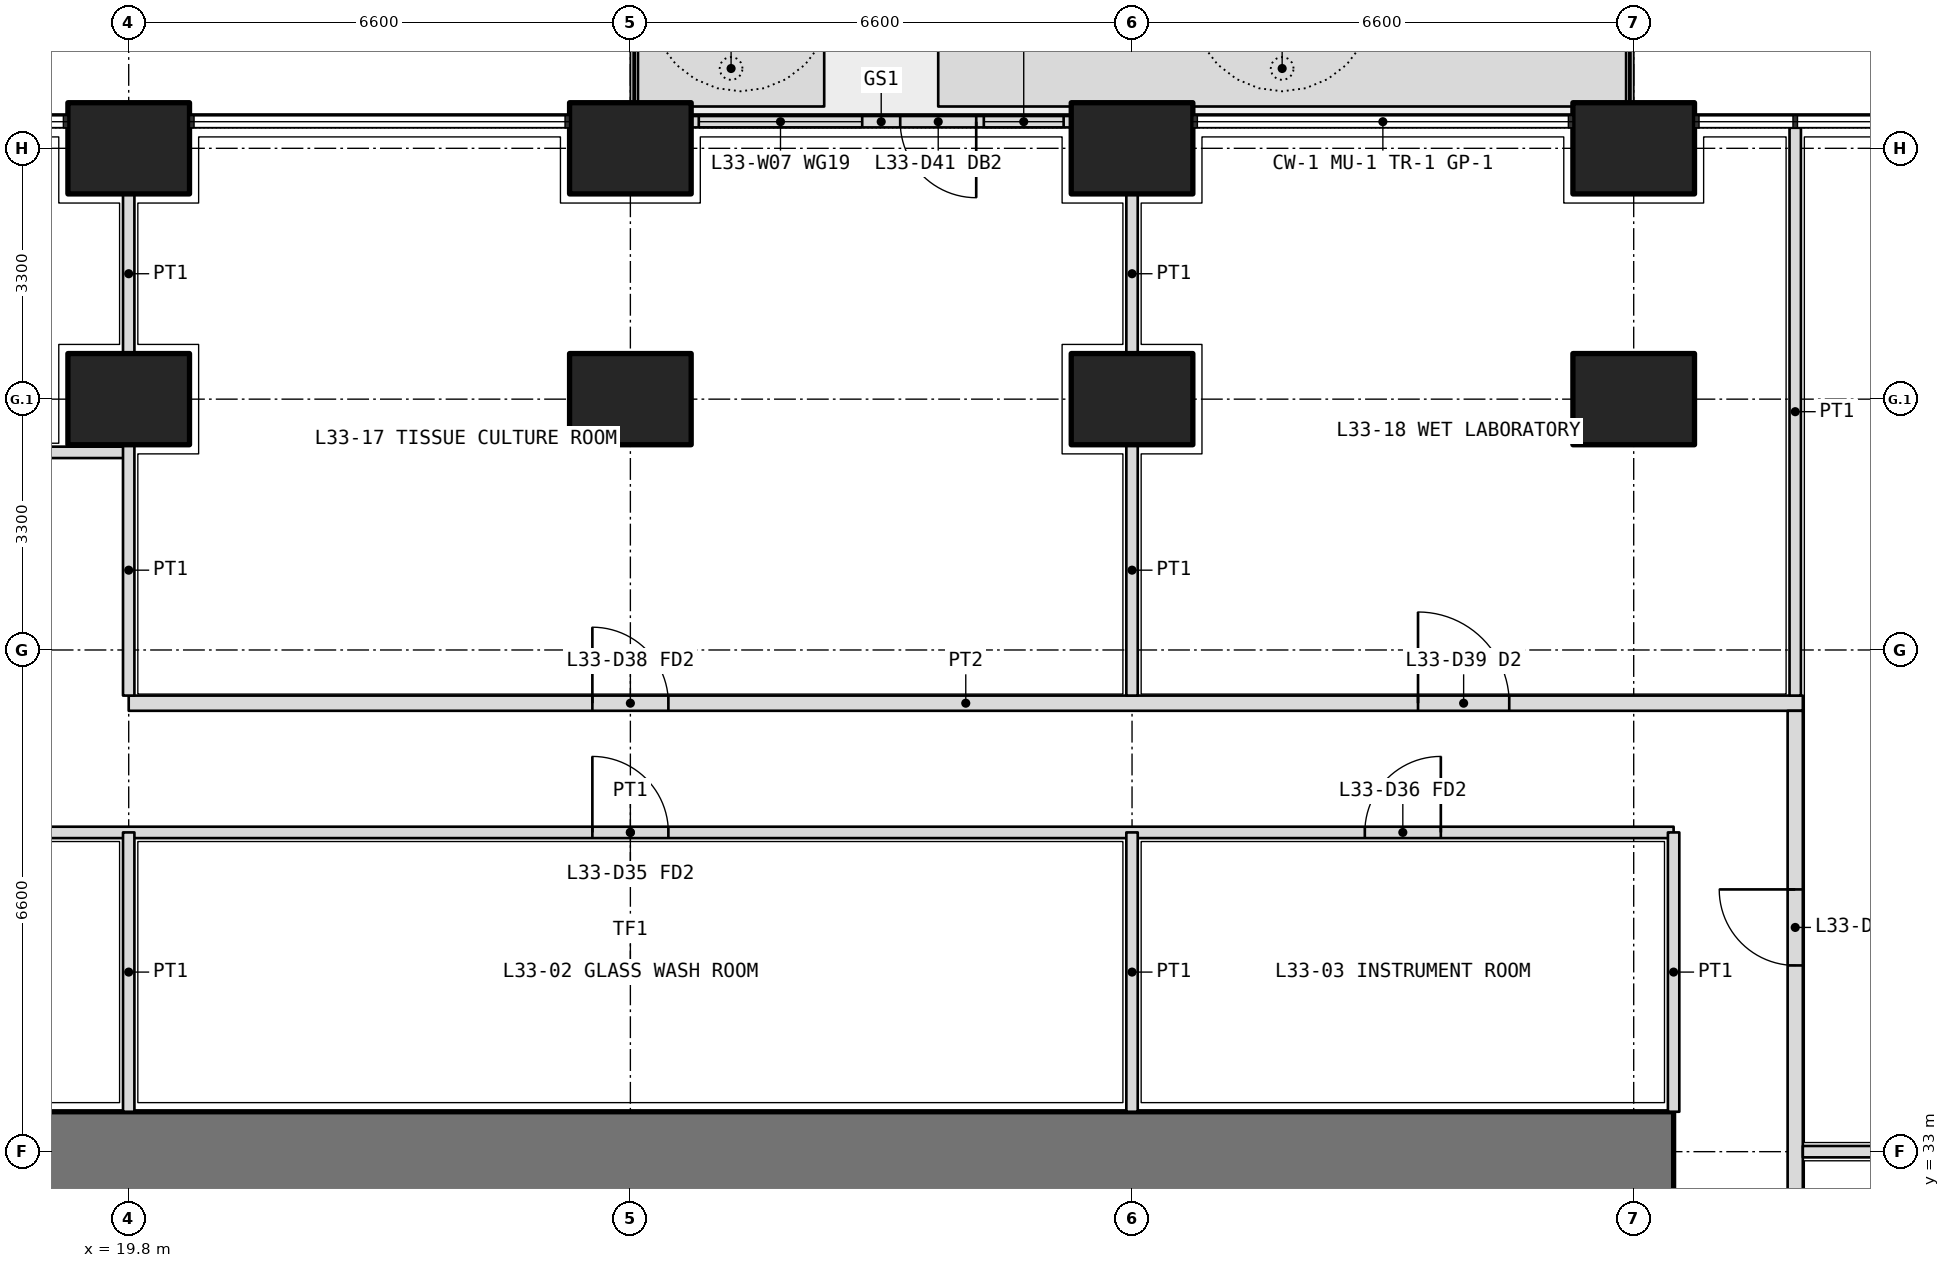
"""IFC4 building model, lengths in metres.
Left out: names, types, materials, properties, quantities, classifications, styles, units other than length and angle.
Written with IfcOpenShell. Run it as: python <this file> out.ifc"""

import sys

from ifc_helpers import new_model, si_unit, direction, frame, frame_2d, origin, origin_2d, place, context, subcontext, project, spatial, polyline, rectangle, outline, extrude, element, fill, save


model = new_model("IFC4")
c1 = context("Model", 3, precision=1e-05, world=origin(), true_north=direction((0.0, 1.0)))
c2 = subcontext(c1, "Body", "Model", "MODEL_VIEW")
j1 = project(units=[si_unit("LENGTHUNIT", "METRE"), si_unit("PLANEANGLEUNIT", "RADIAN")], contexts=[c1])
p1 = place(None, origin())
s1 = spatial("IfcSite", under=j1, at=p1, CompositionType="ELEMENT")
p2 = place(p1, origin())
s2 = spatial("IfcBuilding", under=s1, at=p2, CompositionType="ELEMENT")
p3 = place(p2, frame((0.0, 0.0, 145.2)))
s3 = spatial("IfcBuildingStorey", under=s2, at=p3, CompositionType="ELEMENT", Elevation=145.2)
for number, where, z_axis, x_axis in (
    (1, (19.8, 46.2, 0.0), (0.0, 0.0, 1.0), (1.0, 0.0, 0.0)),
    (2, (26.4, 46.2, 0.0), (0.0, 0.0, 1.0), (1.0, 0.0, 0.0)),
    (3, (33.0, 46.2, 0.0), (0.0, 0.0, 1.0), (1.0, 0.0, 0.0)),
    (4, (39.6, 46.2, 0.0), (0.0, 0.0, 1.0), (1.0, 0.0, 0.0)),
    (5, (19.8, 42.9, 0.0), (0.0, 0.0, 1.0), (1.0, 0.0, 0.0)),
    (6, (26.4, 42.9, 0.0), (0.0, 0.0, 1.0), (1.0, 0.0, 0.0)),
    (7, (33.0, 42.9, 0.0), (0.0, 0.0, 1.0), (1.0, 0.0, 0.0)),
    (8, (39.6, 42.9, 0.0), (0.0, 0.0, 1.0), (1.0, 0.0, 0.0)),
):
    element("IfcColumn", number, at=place(p3, frame(where, z_axis=z_axis, x_axis=x_axis)), inside=s3, PredefinedType="COLUMN", context=c2, shape_type="SweptSolid", body=[
        extrude(rectangle(XDim=1.6, YDim=1.2, at=origin_2d()), origin(), (0.0, 0.0, 1.0), 4.2),
    ])
p4 = place(p3, origin())
e9 = element("IfcWall", 9, at=p4, inside=s3, PredefinedType="USERDEFINED", context=c2, shape_type="SweptSolid", body=[
    extrude(outline(polyline([(26.5, 46.75), (28.95, 46.75), (28.95, 47.75), (26.5, 47.75), (26.5, 46.75)]), holes=[polyline([(26.65, 46.9), (28.8, 46.9), (28.8, 47.6), (26.65, 47.6), (26.65, 46.9)])]), origin(), (0.0, 0.0, 1.0), 1.05),
])
p5 = place(p3, origin())
e10 = element("IfcWall", 10, at=p5, inside=s3, PredefinedType="USERDEFINED", context=c2, shape_type="SweptSolid", body=[
    extrude(outline(polyline([(30.45, 46.75), (39.5, 46.75), (39.5, 47.75), (30.45, 47.75), (30.45, 46.75)]), holes=[polyline([(30.6, 46.9), (39.35, 46.9), (39.35, 47.6), (30.6, 47.6), (30.6, 46.9)])]), origin(), (0.0, 0.0, 1.0), 1.05),
])
p6 = place(p3, frame((32.2, 46.55, 0.0), z_axis=(0.0, 0.0, 1.0), x_axis=(-1.0, 0.0, 0.0)))
e11 = element("IfcWall", 11, at=p6, inside=s3, PredefinedType="SOLIDWALL", context=c2, shape_type="SweptSolid", body=[
    extrude(rectangle(XDim=5.0, YDim=0.15, at=frame_2d((2.5, 0.0))), origin(), (0.0, 0.0, 1.0), 2.05),
])
p7 = place(p6, frame((1.25, 0.0, 0.0)))
e12 = element("IfcOpeningElement", 12, at=p7, cuts=e11, PredefinedType="OPENING", context=c2, shape_type="SweptSolid", body=[
    extrude(rectangle(XDim=1.0, YDim=2.0, at=frame_2d((0.5, 1.0))), frame((0.0, 0.085, 0.0), z_axis=(0.0, -1.0, 0.0), x_axis=(1.0, 0.0, 0.0)), (0.0, 0.0, 1.0), 0.17),
])
p8 = place(p6, frame((0.1, 0.0, 0.1)))
e13 = element("IfcOpeningElement", 13, at=p8, cuts=e11, PredefinedType="OPENING", context=c2, shape_type="SweptSolid", body=[
    extrude(rectangle(XDim=1.05, YDim=1.65, at=frame_2d((0.525, 0.825))), frame((0.0, 0.085, 0.0), z_axis=(0.0, -1.0, 0.0), x_axis=(1.0, 0.0, 0.0)), (0.0, 0.0, 1.0), 0.17),
])
p9 = place(p6, frame((2.75, 0.0, 0.1)))
e14 = element("IfcOpeningElement", 14, at=p9, cuts=e11, PredefinedType="OPENING", context=c2, shape_type="SweptSolid", body=[
    extrude(rectangle(XDim=2.15, YDim=1.65, at=frame_2d((1.075, 0.825))), frame((0.0, 0.085, 0.0), z_axis=(0.0, -1.0, 0.0), x_axis=(1.0, 0.0, 0.0)), (0.0, 0.0, 1.0), 0.17),
])
p10 = place(p3, frame((40.125, 33.0, 0.0), z_axis=(0.0, 0.0, 1.0), x_axis=(-1.0, 0.0, 0.0)))
e15 = element("IfcWall", 15, at=p10, inside=s3, PredefinedType="SHEAR", context=c2, shape_type="SweptSolid", body=[
    extrude(rectangle(XDim=27.45, YDim=1.05, at=frame_2d((13.725, 0.0))), origin(), (0.0, 0.0, 1.0), 4.2),
])
p11 = place(p3, frame((12.675, 37.2, 0.0), z_axis=(0.0, 0.0, 1.0), x_axis=(1.0, 0.0, 0.0)))
e16 = element("IfcWall", 16, at=p11, inside=s3, PredefinedType="PARTITIONING", context=c2, shape_type="SweptSolid", body=[
    extrude(rectangle(XDim=27.45, YDim=0.15, at=frame_2d((13.725, 0.0))), origin(), (0.0, 0.0, 1.0), 2.55),
])
p12 = place(p11, frame((3.062, 0.0, 0.0)))
e17 = element("IfcOpeningElement", 17, at=p12, cuts=e16, PredefinedType="OPENING", context=c2, shape_type="SweptSolid", body=[
    extrude(rectangle(XDim=1.0, YDim=2.1, at=frame_2d((0.5, 1.05))), frame((0.0, 0.085, 0.0), z_axis=(0.0, -1.0, 0.0), x_axis=(1.0, 0.0, 0.0)), (0.0, 0.0, 1.0), 0.17),
])
p13 = place(p11, frame((13.225, 0.0, 0.0)))
e18 = element("IfcOpeningElement", 18, at=p13, cuts=e16, PredefinedType="OPENING", context=c2, shape_type="SweptSolid", body=[
    extrude(rectangle(XDim=1.0, YDim=2.1, at=frame_2d((0.5, 1.05))), frame((0.0, 0.085, 0.0), z_axis=(0.0, -1.0, 0.0), x_axis=(1.0, 0.0, 0.0)), (0.0, 0.0, 1.0), 0.17),
])
p14 = place(p11, frame((23.387, 0.0, 0.0)))
e19 = element("IfcOpeningElement", 19, at=p14, cuts=e16, PredefinedType="OPENING", context=c2, shape_type="SweptSolid", body=[
    extrude(rectangle(XDim=1.0, YDim=2.1, at=frame_2d((0.5, 1.05))), frame((0.0, 0.085, 0.0), z_axis=(0.0, -1.0, 0.0), x_axis=(1.0, 0.0, 0.0)), (0.0, 0.0, 1.0), 0.17),
])
for number, where, z_axis, x_axis in (
    (20, (40.125, 33.525, 0.0), (0.0, 0.0, 1.0), (0.0, 1.0, 0.0)),
    (21, (19.8, 33.525, 0.0), (0.0, 0.0, 1.0), (0.0, 1.0, 0.0)),
    (22, (33.0, 33.525, 0.0), (0.0, 0.0, 1.0), (0.0, 1.0, 0.0)),
):
    element("IfcWall", number, at=place(p3, frame(where, z_axis=z_axis, x_axis=x_axis)), inside=s3, PredefinedType="PARTITIONING", context=c2, shape_type="SweptSolid", body=[
        extrude(rectangle(XDim=3.675, YDim=0.15, at=frame_2d((1.837, 0.0))), origin(), (0.0, 0.0, 1.0), 2.55),
    ])
p15 = place(p3, frame((19.8, 38.9, 0.0), z_axis=(0.0, 0.0, 1.0), x_axis=(1.0, 0.0, 0.0)))
e23 = element("IfcWall", 23, at=p15, inside=s3, PredefinedType="PARTITIONING", context=c2, shape_type="SweptSolid", body=[
    extrude(rectangle(XDim=22.025, YDim=0.2, at=frame_2d((11.012, 0.0))), origin(), (0.0, 0.0, 1.0), 2.55),
])
p16 = place(p15, frame((6.1, 0.0, 0.0)))
e24 = element("IfcOpeningElement", 24, at=p16, cuts=e23, PredefinedType="OPENING", context=c2, shape_type="SweptSolid", body=[
    extrude(rectangle(XDim=1.0, YDim=2.1, at=frame_2d((0.5, 1.05))), frame((0.0, 0.11, 0.0), z_axis=(0.0, -1.0, 0.0), x_axis=(1.0, 0.0, 0.0)), (0.0, 0.0, 1.0), 0.22),
])
p17 = place(p15, frame((16.962, 0.0, 0.0)))
e25 = element("IfcOpeningElement", 25, at=p17, cuts=e23, PredefinedType="OPENING", context=c2, shape_type="SweptSolid", body=[
    extrude(rectangle(XDim=1.2, YDim=2.1, at=frame_2d((0.6, 1.05))), frame((0.0, 0.11, 0.0), z_axis=(0.0, -1.0, 0.0), x_axis=(1.0, 0.0, 0.0)), (0.0, 0.0, 1.0), 0.22),
])
p18 = place(p3, frame((41.725, 11.175, 0.0), z_axis=(0.0, 0.0, 1.0), x_axis=(0.0, 1.0, 0.0)))
e26 = element("IfcWall", 26, at=p18, inside=s3, PredefinedType="PARTITIONING", context=c2, shape_type="SweptSolid", body=[
    extrude(rectangle(XDim=27.625, YDim=0.2, at=frame_2d((13.812, 0.0))), origin(), (0.0, 0.0, 1.0), 2.55),
])
p19 = place(p18, frame((3.762, 0.0, 0.0)))
e27 = element("IfcOpeningElement", 27, at=p19, cuts=e26, PredefinedType="OPENING", context=c2, shape_type="SweptSolid", body=[
    extrude(rectangle(XDim=1.0, YDim=2.1, at=frame_2d((0.5, 1.05))), frame((0.0, 0.11, 0.0), z_axis=(0.0, -1.0, 0.0), x_axis=(1.0, 0.0, 0.0)), (0.0, 0.0, 1.0), 0.22),
])
p20 = place(p18, frame((9.725, 0.0, 0.0)))
e28 = element("IfcOpeningElement", 28, at=p20, cuts=e26, PredefinedType="OPENING", context=c2, shape_type="SweptSolid", body=[
    extrude(rectangle(XDim=1.0, YDim=2.1, at=frame_2d((0.5, 1.05))), frame((0.0, 0.11, 0.0), z_axis=(0.0, -1.0, 0.0), x_axis=(1.0, 0.0, 0.0)), (0.0, 0.0, 1.0), 0.22),
])
p21 = place(p18, frame((13.075, 0.0, 0.0)))
e29 = element("IfcOpeningElement", 29, at=p21, cuts=e26, PredefinedType="OPENING", context=c2, shape_type="SweptSolid", body=[
    extrude(rectangle(XDim=0.9, YDim=2.1, at=frame_2d((0.45, 1.05))), frame((0.0, 0.11, 0.0), z_axis=(0.0, -1.0, 0.0), x_axis=(1.0, 0.0, 0.0)), (0.0, 0.0, 1.0), 0.22),
])
p22 = place(p18, frame((16.375, 0.0, 0.0)))
e30 = element("IfcOpeningElement", 30, at=p22, cuts=e26, PredefinedType="OPENING", context=c2, shape_type="SweptSolid", body=[
    extrude(rectangle(XDim=1.0, YDim=2.1, at=frame_2d((0.5, 1.05))), frame((0.0, 0.11, 0.0), z_axis=(0.0, -1.0, 0.0), x_axis=(1.0, 0.0, 0.0)), (0.0, 0.0, 1.0), 0.22),
])
p23 = place(p18, frame((19.675, 0.0, 0.0)))
e31 = element("IfcOpeningElement", 31, at=p23, cuts=e26, PredefinedType="OPENING", context=c2, shape_type="SweptSolid", body=[
    extrude(rectangle(XDim=1.0, YDim=2.1, at=frame_2d((0.5, 1.05))), frame((0.0, 0.11, 0.0), z_axis=(0.0, -1.0, 0.0), x_axis=(1.0, 0.0, 0.0)), (0.0, 0.0, 1.0), 0.22),
])
p24 = place(p18, frame((24.275, 0.0, 0.0)))
e32 = element("IfcOpeningElement", 32, at=p24, cuts=e26, PredefinedType="OPENING", context=c2, shape_type="SweptSolid", body=[
    extrude(rectangle(XDim=1.0, YDim=2.1, at=frame_2d((0.5, 1.05))), frame((0.0, 0.11, 0.0), z_axis=(0.0, -1.0, 0.0), x_axis=(1.0, 0.0, 0.0)), (0.0, 0.0, 1.0), 0.22),
])
p25 = place(p3, frame((41.725, 46.47, 0.0), z_axis=(0.0, 0.0, 1.0), x_axis=(0.0, -1.0, 0.0)))
e33 = element("IfcWall", 33, at=p25, inside=s3, PredefinedType="PARTITIONING", context=c2, shape_type="SweptSolid", body=[
    extrude(rectangle(XDim=7.47, YDim=0.15, at=frame_2d((3.735, 0.0))), origin(), (0.0, 0.0, 1.0), 3.85),
])
p26 = place(p3, frame((45.6, 33.0, 0.0), z_axis=(0.0, 0.0, 1.0), x_axis=(-1.0, 0.0, 0.0)))
e34 = element("IfcWall", 34, at=p26, inside=s3, PredefinedType="PARTITIONING", context=c2, shape_type="SweptSolid", body=[
    extrude(rectangle(XDim=3.775, YDim=0.15, at=frame_2d((1.888, 0.0))), origin(), (0.0, 0.0, 1.0), 2.55),
])
p27 = place(p3, frame((13.2, 42.2, 0.0), z_axis=(0.0, 0.0, 1.0), x_axis=(1.0, 0.0, 0.0)))
e35 = element("IfcWall", 35, at=p27, inside=s3, PredefinedType="PARTITIONING", context=c2, shape_type="SweptSolid", body=[
    extrude(rectangle(XDim=6.6, YDim=0.15, at=frame_2d((3.3, 0.0))), origin(), (0.0, 0.0, 1.0), 2.55),
])
p28 = place(p27, frame((2.8, 0.0, 0.0)))
e36 = element("IfcOpeningElement", 36, at=p28, cuts=e35, PredefinedType="OPENING", context=c2, shape_type="SweptSolid", body=[
    extrude(rectangle(XDim=1.0, YDim=2.1, at=frame_2d((0.5, 1.05))), frame((0.0, 0.085, 0.0), z_axis=(0.0, -1.0, 0.0), x_axis=(1.0, 0.0, 0.0)), (0.0, 0.0, 1.0), 0.17),
])
p29 = place(p3, frame((19.8, 45.6, 0.0), z_axis=(0.0, 0.0, 1.0), x_axis=(0.0, -1.0, 0.0)))
e37 = element("IfcWall", 37, at=p29, inside=s3, PredefinedType="PARTITIONING", context=c2, shape_type="SweptSolid", body=[
    extrude(rectangle(XDim=2.1, YDim=0.15, at=frame_2d((1.05, 0.0))), origin(), (0.0, 0.0, 1.0), 2.55),
])
p30 = place(p3, frame((19.8, 42.3, 0.0), z_axis=(0.0, 0.0, 1.0), x_axis=(0.0, -1.0, 0.0)))
e38 = element("IfcWall", 38, at=p30, inside=s3, PredefinedType="PARTITIONING", context=c2, shape_type="SweptSolid", body=[
    extrude(rectangle(XDim=3.3, YDim=0.15, at=frame_2d((1.65, 0.0))), origin(), (0.0, 0.0, 1.0), 2.55),
])
p31 = place(p3, frame((33.0, 45.6, 0.0), z_axis=(0.0, 0.0, 1.0), x_axis=(0.0, -1.0, 0.0)))
e39 = element("IfcWall", 39, at=p31, inside=s3, PredefinedType="PARTITIONING", context=c2, shape_type="SweptSolid", body=[
    extrude(rectangle(XDim=2.1, YDim=0.15, at=frame_2d((1.05, 0.0))), origin(), (0.0, 0.0, 1.0), 2.55),
])
p32 = place(p3, frame((33.0, 42.3, 0.0), z_axis=(0.0, 0.0, 1.0), x_axis=(0.0, -1.0, 0.0)))
e40 = element("IfcWall", 40, at=p32, inside=s3, PredefinedType="PARTITIONING", context=c2, shape_type="SweptSolid", body=[
    extrude(rectangle(XDim=3.3, YDim=0.15, at=frame_2d((1.65, 0.0))), origin(), (0.0, 0.0, 1.0), 2.55),
])
p33 = place(p7, origin())
e41 = element("IfcDoor", 41, at=p33, inside=s3, OperationType="SINGLE_SWING_LEFT", PredefinedType="DOOR", context=c2, shape_type="SweptSolid", body=[
    extrude(rectangle(XDim=1.0, YDim=2.0, at=frame_2d((0.5, 1.0))), frame((0.0, 0.025, 0.0), z_axis=(0.0, -1.0, 0.0), x_axis=(1.0, 0.0, 0.0)), (0.0, 0.0, 1.0), 0.05),
])
fill(e12, e41)
p34 = place(p8, origin())
e42 = element("IfcWindow", 42, at=p34, inside=s3, PartitioningType="SINGLE_PANEL", PredefinedType="WINDOW", context=c2, shape_type="SweptSolid", body=[
    extrude(rectangle(XDim=1.05, YDim=1.65, at=frame_2d((0.525, 0.825))), frame((0.0, 0.03, 0.0), z_axis=(0.0, -1.0, 0.0), x_axis=(1.0, 0.0, 0.0)), (0.0, 0.0, 1.0), 0.06),
])
fill(e13, e42)
p35 = place(p9, origin())
e43 = element("IfcWindow", 43, at=p35, inside=s3, PartitioningType="SINGLE_PANEL", PredefinedType="WINDOW", context=c2, shape_type="SweptSolid", body=[
    extrude(rectangle(XDim=2.15, YDim=1.65, at=frame_2d((1.075, 0.825))), frame((0.0, 0.03, 0.0), z_axis=(0.0, -1.0, 0.0), x_axis=(1.0, 0.0, 0.0)), (0.0, 0.0, 1.0), 0.06),
])
fill(e14, e43)
p36 = place(p13, origin())
e44 = element("IfcDoor", 44, at=p36, inside=s3, OperationType="SINGLE_SWING_LEFT", PredefinedType="DOOR", context=c2, shape_type="SweptSolid", body=[
    extrude(rectangle(XDim=1.0, YDim=2.1, at=frame_2d((0.5, 1.05))), frame((0.0, 0.025, 0.0), z_axis=(0.0, -1.0, 0.0), x_axis=(1.0, 0.0, 0.0)), (0.0, 0.0, 1.0), 0.05),
])
fill(e18, e44)
p37 = place(p14, origin())
e45 = element("IfcDoor", 45, at=p37, inside=s3, OperationType="SINGLE_SWING_RIGHT", PredefinedType="DOOR", context=c2, shape_type="SweptSolid", body=[
    extrude(rectangle(XDim=1.0, YDim=2.1, at=frame_2d((0.5, 1.05))), frame((0.0, 0.025, 0.0), z_axis=(0.0, -1.0, 0.0), x_axis=(1.0, 0.0, 0.0)), (0.0, 0.0, 1.0), 0.05),
])
fill(e19, e45)
p38 = place(p24, origin())
e46 = element("IfcDoor", 46, at=p38, inside=s3, OperationType="SINGLE_SWING_RIGHT", PredefinedType="DOOR", context=c2, shape_type="SweptSolid", body=[
    extrude(rectangle(XDim=1.0, YDim=2.1, at=frame_2d((0.5, 1.05))), frame((0.0, 0.025, 0.0), z_axis=(0.0, -1.0, 0.0), x_axis=(1.0, 0.0, 0.0)), (0.0, 0.0, 1.0), 0.05),
])
fill(e32, e46)
p39 = place(p16, origin())
e47 = element("IfcDoor", 47, at=p39, inside=s3, OperationType="SINGLE_SWING_LEFT", PredefinedType="DOOR", context=c2, shape_type="SweptSolid", body=[
    extrude(rectangle(XDim=1.0, YDim=2.1, at=frame_2d((0.5, 1.05))), frame((0.0, 0.025, 0.0), z_axis=(0.0, -1.0, 0.0), x_axis=(1.0, 0.0, 0.0)), (0.0, 0.0, 1.0), 0.05),
])
fill(e24, e47)
p40 = place(p17, origin())
e48 = element("IfcDoor", 48, at=p40, inside=s3, OperationType="DOUBLE_DOOR_SINGLE_SWING", PredefinedType="DOOR", context=c2, shape_type="SweptSolid", body=[
    extrude(rectangle(XDim=1.2, YDim=2.1, at=frame_2d((0.6, 1.05))), frame((0.0, 0.025, 0.0), z_axis=(0.0, -1.0, 0.0), x_axis=(1.0, 0.0, 0.0)), (0.0, 0.0, 1.0), 0.05),
])
fill(e25, e48)
save(model, sys.argv[1])
